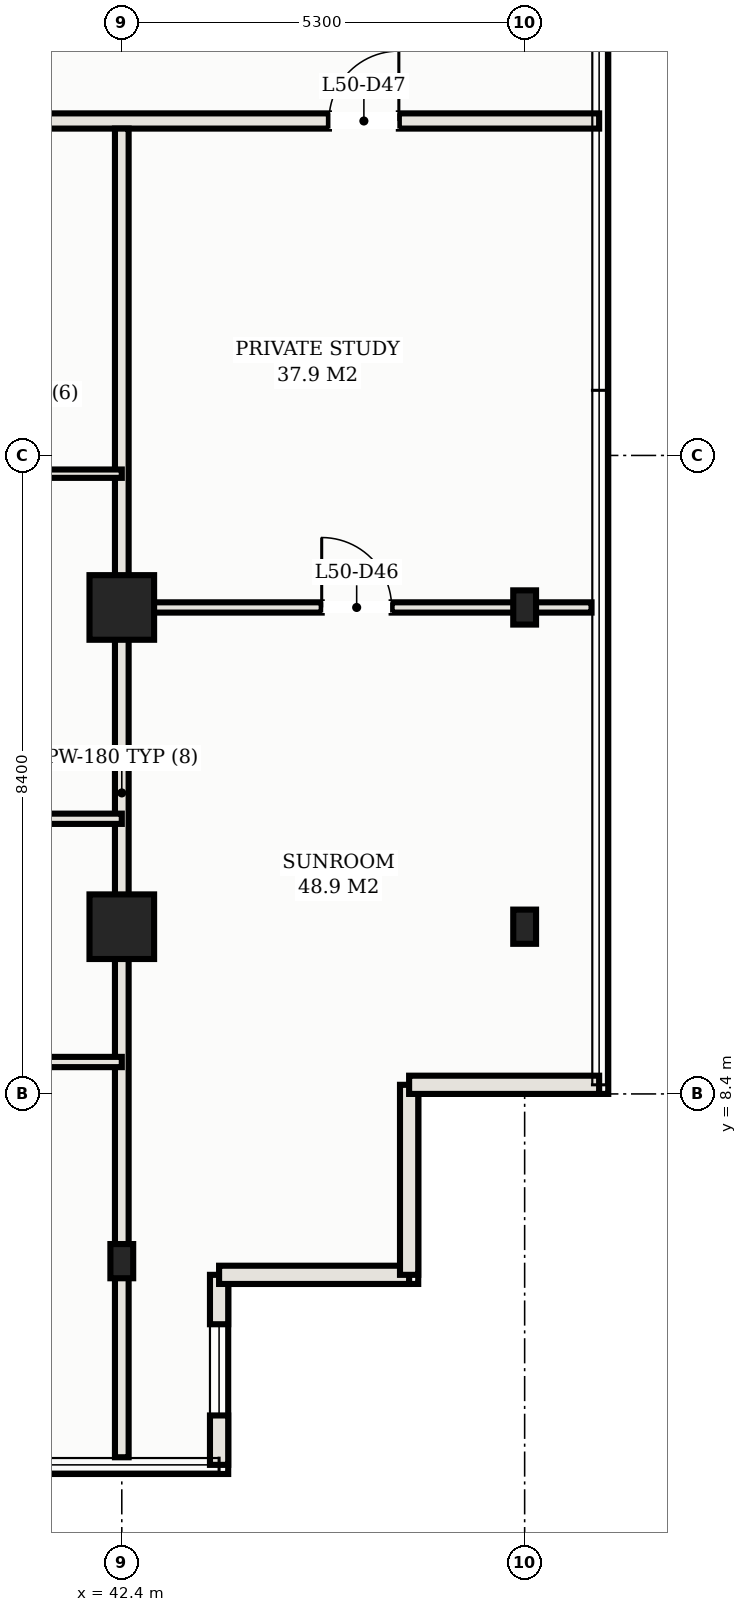
"""IFC4 building model, lengths in metres.
Left out: names, types, materials, properties, quantities, classifications, styles, units other than length and angle.
Written with IfcOpenShell. Run it as: python <this file> out.ifc"""

import sys

from ifc_helpers import new_model, si_unit, direction, frame, frame_2d, origin, origin_2d, place, context, subcontext, project, spatial, rectangle, hollow_rectangle, extrude, element, fill, save


model = new_model("IFC4")
c1 = context("Model", 3, precision=1e-05, world=origin(), true_north=direction((0.0, 1.0)))
c2 = subcontext(c1, "Body", "Model", "MODEL_VIEW")
j1 = project(units=[si_unit("LENGTHUNIT", "METRE"), si_unit("PLANEANGLEUNIT", "RADIAN")], contexts=[c1])
p1 = place(None, origin())
s1 = spatial("IfcSite", under=j1, at=p1, CompositionType="ELEMENT")
p2 = place(p1, origin())
s2 = spatial("IfcBuilding", under=s1, at=p2, CompositionType="ELEMENT")
p3 = place(p2, frame((0.0, 0.0, 182.1)))
s3 = spatial("IfcBuildingStorey", under=s2, at=p3, CompositionType="ELEMENT", Elevation=182.1)
for number, where, z_axis, x_axis in (
    (1, (42.4, 14.8, 0.0), (0.0, 0.0, 1.0), (1.0, 0.0, 0.0)),
    (2, (42.4, 10.6, 0.0), (0.0, 0.0, 1.0), (1.0, 0.0, 0.0)),
):
    element("IfcColumn", number, at=place(p3, frame(where, z_axis=z_axis, x_axis=x_axis)), inside=s3, PredefinedType="COLUMN", context=c2, shape_type="SweptSolid", body=[
        extrude(hollow_rectangle(XDim=0.85, YDim=0.85, WallThickness=0.028, at=origin_2d()), origin(), (0.0, 0.0, 1.0), 3.3),
    ])
for number, where, z_axis, x_axis in (
    (3, (42.4, 6.2, 0.0), (0.0, 0.0, 1.0), (1.0, 0.0, 0.0)),
    (4, (47.7, 10.6, 0.0), (0.0, 0.0, 1.0), (1.0, 0.0, 0.0)),
    (5, (47.7, 14.8, 0.0), (0.0, 0.0, 1.0), (1.0, 0.0, 0.0)),
):
    element("IfcColumn", number, at=place(p3, frame(where, z_axis=z_axis, x_axis=x_axis)), inside=s3, PredefinedType="COLUMN", context=c2, shape_type="SweptSolid", body=[
        extrude(hollow_rectangle(XDim=0.3, YDim=0.45, WallThickness=0.016, at=origin_2d()), origin(), (0.0, 0.0, 1.0), 3.3),
    ])
p4 = place(p3, frame((43.68, 3.52, 0.0), z_axis=(0.0, 0.0, 1.0), x_axis=(0.0, 1.0, 0.0)))
e6 = element("IfcWall", 6, at=p4, inside=s3, PredefinedType="SOLIDWALL", context=c2, shape_type="SweptSolid", body=[
    extrude(rectangle(XDim=2.5, YDim=0.24, at=frame_2d((1.25, 0.0))), origin(), (0.0, 0.0, 1.0), 3.03),
])
p5 = place(p4, frame((0.65, 0.0, 0.75)))
e7 = element("IfcOpeningElement", 7, at=p5, cuts=e6, PredefinedType="OPENING", context=c2, shape_type="SweptSolid", body=[
    extrude(rectangle(XDim=1.2, YDim=1.5, at=frame_2d((0.6, 0.75))), frame((0.0, 0.13, 0.0), z_axis=(0.0, -1.0, 0.0), x_axis=(1.0, 0.0, 0.0)), (0.0, 0.0, 1.0), 0.26),
])
for number, where, z_axis, x_axis in (
    (8, (43.68, 6.02, 0.0), (0.0, 0.0, 1.0), (1.0, 0.0, 0.0)),
    (9, (46.18, 6.02, 0.0), (0.0, 0.0, 1.0), (0.0, 1.0, 0.0)),
    (10, (46.18, 8.52, 0.0), (0.0, 0.0, 1.0), (1.0, 0.0, 0.0)),
):
    element("IfcWall", number, at=place(p3, frame(where, z_axis=z_axis, x_axis=x_axis)), inside=s3, PredefinedType="SOLIDWALL", context=c2, shape_type="SweptSolid", body=[
        extrude(rectangle(XDim=2.5, YDim=0.24, at=frame_2d((1.25, 0.0))), origin(), (0.0, 0.0, 1.0), 3.03),
    ])
p6 = place(p3, frame((4.32, 21.2, 0.0), z_axis=(0.0, 0.0, 1.0), x_axis=(1.0, 0.0, 0.0)))
e11 = element("IfcWall", 11, at=p6, inside=s3, PredefinedType="PARTITIONING", context=c2, shape_type="SweptSolid", body=[
    extrude(rectangle(XDim=44.36, YDim=0.2, at=frame_2d((22.18, 0.0))), origin(), (0.0, 0.0, 1.0), 2.57),
])
p7 = place(p6, frame((7.03, 0.0, 0.0)))
e12 = element("IfcOpeningElement", 12, at=p7, cuts=e11, PredefinedType="OPENING", context=c2, shape_type="SweptSolid", body=[
    extrude(rectangle(XDim=1.1, YDim=2.25, at=frame_2d((0.55, 1.125))), frame((0.0, 0.11, 0.0), z_axis=(0.0, -1.0, 0.0), x_axis=(1.0, 0.0, 0.0)), (0.0, 0.0, 1.0), 0.22),
])
p8 = place(p6, frame((28.23, 0.0, 0.0)))
e13 = element("IfcOpeningElement", 13, at=p8, cuts=e11, PredefinedType="OPENING", context=c2, shape_type="SweptSolid", body=[
    extrude(rectangle(XDim=1.1, YDim=2.25, at=frame_2d((0.55, 1.125))), frame((0.0, 0.11, 0.0), z_axis=(0.0, -1.0, 0.0), x_axis=(1.0, 0.0, 0.0)), (0.0, 0.0, 1.0), 0.22),
])
p9 = place(p6, frame((2.635, 0.0, 0.0)))
e14 = element("IfcOpeningElement", 14, at=p9, cuts=e11, PredefinedType="OPENING", context=c2, shape_type="SweptSolid", body=[
    extrude(rectangle(XDim=0.92, YDim=2.15, at=frame_2d((0.46, 1.075))), frame((0.0, 0.11, 0.0), z_axis=(0.0, -1.0, 0.0), x_axis=(1.0, 0.0, 0.0)), (0.0, 0.0, 1.0), 0.22),
])
p10 = place(p6, frame((40.805, 0.0, 0.0)))
e15 = element("IfcOpeningElement", 15, at=p10, cuts=e11, PredefinedType="OPENING", context=c2, shape_type="SweptSolid", body=[
    extrude(rectangle(XDim=0.92, YDim=2.15, at=frame_2d((0.46, 1.075))), frame((0.0, 0.11, 0.0), z_axis=(0.0, -1.0, 0.0), x_axis=(1.0, 0.0, 0.0)), (0.0, 0.0, 1.0), 0.22),
])
p11 = place(p3, frame((42.4, 3.62, 0.0), z_axis=(0.0, 0.0, 1.0), x_axis=(0.0, 1.0, 0.0)))
e16 = element("IfcWall", 16, at=p11, inside=s3, PredefinedType="PARTITIONING", context=c2, shape_type="SweptSolid", body=[
    extrude(rectangle(XDim=17.48, YDim=0.18, at=frame_2d((8.74, 0.0))), origin(), (0.0, 0.0, 1.0), 2.325),
])
p12 = place(p3, frame((37.1, 8.82, 0.0), z_axis=(0.0, 0.0, 1.0), x_axis=(1.0, 0.0, 0.0)))
e17 = element("IfcWall", 17, at=p12, inside=s3, PredefinedType="PARTITIONING", context=c2, shape_type="SweptSolid", body=[
    extrude(rectangle(XDim=5.3, YDim=0.135, at=frame_2d((2.65, 0.0))), origin(), (0.0, 0.0, 1.0), 2.57),
])
p13 = place(p12, frame((0.6, 0.0, 0.0)))
e18 = element("IfcOpeningElement", 18, at=p13, cuts=e17, PredefinedType="OPENING", context=c2, shape_type="SweptSolid", body=[
    extrude(rectangle(XDim=0.95, YDim=2.15, at=frame_2d((0.475, 1.075))), frame((0.0, 0.078, 0.0), z_axis=(0.0, -1.0, 0.0), x_axis=(1.0, 0.0, 0.0)), (0.0, 0.0, 1.0), 0.155),
])
p14 = place(p12, frame((3.275, 0.0, 0.0)))
e19 = element("IfcOpeningElement", 19, at=p14, cuts=e17, PredefinedType="OPENING", context=c2, shape_type="SweptSolid", body=[
    extrude(rectangle(XDim=0.9, YDim=2.15, at=frame_2d((0.45, 1.075))), frame((0.0, 0.078, 0.0), z_axis=(0.0, -1.0, 0.0), x_axis=(1.0, 0.0, 0.0)), (0.0, 0.0, 1.0), 0.155),
])
p15 = place(p3, frame((39.25, 12.02, 0.0), z_axis=(0.0, 0.0, 1.0), x_axis=(1.0, 0.0, 0.0)))
e20 = element("IfcWall", 20, at=p15, inside=s3, PredefinedType="PARTITIONING", context=c2, shape_type="SweptSolid", body=[
    extrude(rectangle(XDim=3.15, YDim=0.135, at=frame_2d((1.575, 0.0))), origin(), (0.0, 0.0, 1.0), 2.57),
])
p16 = place(p3, frame((39.25, 16.56, 0.0), z_axis=(0.0, 0.0, 1.0), x_axis=(1.0, 0.0, 0.0)))
e21 = element("IfcWall", 21, at=p16, inside=s3, PredefinedType="MOVABLE", context=c2, shape_type="SweptSolid", body=[
    extrude(rectangle(XDim=3.15, YDim=0.11, at=frame_2d((1.575, 0.0))), origin(), (0.0, 0.0, 1.0), 2.57),
])
p17 = place(p16, frame((1.115, 0.0, 0.0)))
e22 = element("IfcOpeningElement", 22, at=p17, cuts=e21, PredefinedType="OPENING", context=c2, shape_type="SweptSolid", body=[
    extrude(rectangle(XDim=0.92, YDim=2.15, at=frame_2d((0.46, 1.075))), frame((0.0, 0.065, 0.0), z_axis=(0.0, -1.0, 0.0), x_axis=(1.0, 0.0, 0.0)), (0.0, 0.0, 1.0), 0.13),
])
p18 = place(p3, frame((42.4, 14.8, 0.0), z_axis=(0.0, 0.0, 1.0), x_axis=(1.0, 0.0, 0.0)))
e23 = element("IfcWall", 23, at=p18, inside=s3, PredefinedType="PARTITIONING", context=c2, shape_type="SweptSolid", body=[
    extrude(rectangle(XDim=6.18, YDim=0.135, at=frame_2d((3.09, 0.0))), origin(), (0.0, 0.0, 1.0), 2.325),
])
p19 = place(p18, frame((2.63, 0.0, 0.0)))
e24 = element("IfcOpeningElement", 24, at=p19, cuts=e23, PredefinedType="OPENING", context=c2, shape_type="SweptSolid", body=[
    extrude(rectangle(XDim=0.92, YDim=2.15, at=frame_2d((0.46, 1.075))), frame((0.0, 0.078, 0.0), z_axis=(0.0, -1.0, 0.0), x_axis=(1.0, 0.0, 0.0)), (0.0, 0.0, 1.0), 0.155),
])
p20 = place(p5, origin())
e25 = element("IfcWindow", 25, at=p20, inside=s3, PartitioningType="SINGLE_PANEL", PredefinedType="WINDOW", context=c2, shape_type="SweptSolid", body=[
    extrude(rectangle(XDim=1.2, YDim=1.5, at=frame_2d((0.6, 0.75))), frame((0.0, 0.03, 0.0), z_axis=(0.0, -1.0, 0.0), x_axis=(1.0, 0.0, 0.0)), (0.0, 0.0, 1.0), 0.06),
])
fill(e7, e25)
p21 = place(p19, origin())
e26 = element("IfcDoor", 26, at=p21, inside=s3, OperationType="SINGLE_SWING_LEFT", PredefinedType="DOOR", context=c2, shape_type="SweptSolid", body=[
    extrude(rectangle(XDim=0.92, YDim=2.15, at=frame_2d((0.46, 1.075))), frame((0.0, 0.025, 0.0), z_axis=(0.0, -1.0, 0.0), x_axis=(1.0, 0.0, 0.0)), (0.0, 0.0, 1.0), 0.05),
])
fill(e24, e26)
p22 = place(p10, origin())
e27 = element("IfcDoor", 27, at=p22, inside=s3, OperationType="SINGLE_SWING_RIGHT", PredefinedType="DOOR", context=c2, shape_type="SweptSolid", body=[
    extrude(rectangle(XDim=0.92, YDim=2.15, at=frame_2d((0.46, 1.075))), frame((0.0, 0.025, 0.0), z_axis=(0.0, -1.0, 0.0), x_axis=(1.0, 0.0, 0.0)), (0.0, 0.0, 1.0), 0.05),
])
fill(e15, e27)
save(model, sys.argv[1])
